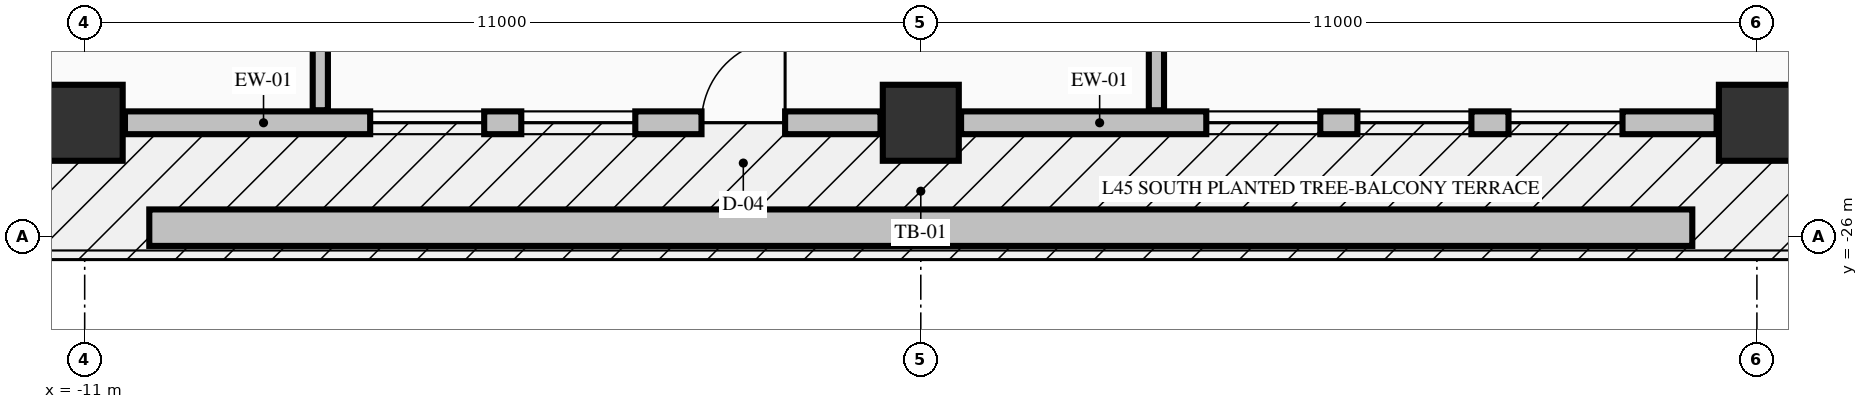
"""IFC4 building model, lengths in metres.
Left out: names, types, materials, properties, quantities, classifications, styles, units other than length and angle.
Written with IfcOpenShell. Run it as: python <this file> out.ifc"""

import sys

from ifc_helpers import new_model, si_unit, direction, frame, frame_2d, origin, origin_2d, place, context, subcontext, project, spatial, rectangle, extrude, element, fill, save


model = new_model("IFC4")
c1 = context("Model", 3, precision=1e-05, world=origin(), true_north=direction((0.0, 1.0)))
c2 = subcontext(c1, "Body", "Model", "MODEL_VIEW")
j1 = project(units=[si_unit("LENGTHUNIT", "METRE"), si_unit("PLANEANGLEUNIT", "RADIAN")], contexts=[c1])
p1 = place(None, origin())
s1 = spatial("IfcSite", under=j1, at=p1, CompositionType="ELEMENT")
p2 = place(p1, origin())
s2 = spatial("IfcBuilding", under=s1, at=p2, CompositionType="ELEMENT")
p3 = place(p2, frame((0.0, 0.0, 176.26)))
s3 = spatial("IfcBuildingStorey", under=s2, at=p3, CompositionType="ELEMENT", Elevation=176.26)
for number, where, z_axis, x_axis in (
    (1, (-11.0, -24.5, -0.275), (0.0, 0.0, 1.0), (1.0, 0.0, 0.0)),
    (2, (0.0, -24.5, -0.275), (0.0, 0.0, 1.0), (1.0, 0.0, 0.0)),
    (3, (11.0, -24.5, -0.275), (0.0, 0.0, 1.0), (1.0, 0.0, 0.0)),
):
    element("IfcColumn", number, at=place(p3, frame(where, z_axis=z_axis, x_axis=x_axis)), inside=s3, PredefinedType="COLUMN", context=c2, shape_type="SweptSolid", body=[
        extrude(rectangle(XDim=1.0, YDim=1.0, at=origin_2d()), origin(), (0.0, 0.0, 1.0), 3.425),
    ])
p4 = place(p3, frame((-10.47, -24.5, 0.0), z_axis=(0.0, 0.0, 1.0), x_axis=(1.0, 0.0, 0.0)))
e4 = element("IfcWall", 4, at=p4, inside=s3, PredefinedType="STANDARD", context=c2, shape_type="SweptSolid", body=[
    extrude(rectangle(XDim=9.94, YDim=0.3, at=frame_2d((4.97, 0.0))), origin(), (0.0, 0.0, 1.0), 2.542),
])
p5 = place(p4, frame((7.585, 0.0, 0.0)))
e5 = element("IfcOpeningElement", 5, at=p5, cuts=e4, PredefinedType="OPENING", context=c2, shape_type="SweptSolid", body=[
    extrude(rectangle(XDim=1.1, YDim=2.15, at=frame_2d((0.55, 1.075))), frame((0.0, 0.16, 0.0), z_axis=(0.0, -1.0, 0.0), x_axis=(1.0, 0.0, 0.0)), (0.0, 0.0, 1.0), 0.32),
])
p6 = place(p4, frame((3.226, 0.0, 0.72)))
e6 = element("IfcOpeningElement", 6, at=p6, cuts=e4, PredefinedType="OPENING", context=c2, shape_type="SweptSolid", body=[
    extrude(rectangle(XDim=1.5, YDim=1.6, at=frame_2d((0.75, 0.8))), frame((0.0, 0.16, 0.0), z_axis=(0.0, -1.0, 0.0), x_axis=(1.0, 0.0, 0.0)), (0.0, 0.0, 1.0), 0.32),
])
p7 = place(p4, frame((5.214, 0.0, 0.72)))
e7 = element("IfcOpeningElement", 7, at=p7, cuts=e4, PredefinedType="OPENING", context=c2, shape_type="SweptSolid", body=[
    extrude(rectangle(XDim=1.5, YDim=1.6, at=frame_2d((0.75, 0.8))), frame((0.0, 0.16, 0.0), z_axis=(0.0, -1.0, 0.0), x_axis=(1.0, 0.0, 0.0)), (0.0, 0.0, 1.0), 0.32),
])
p8 = place(p3, frame((0.53, -24.5, 0.0), z_axis=(0.0, 0.0, 1.0), x_axis=(1.0, 0.0, 0.0)))
e8 = element("IfcWall", 8, at=p8, inside=s3, PredefinedType="STANDARD", context=c2, shape_type="SweptSolid", body=[
    extrude(rectangle(XDim=9.94, YDim=0.3, at=frame_2d((4.97, 0.0))), origin(), (0.0, 0.0, 1.0), 2.542),
])
p9 = place(p8, frame((3.226, 0.0, 0.72)))
e9 = element("IfcOpeningElement", 9, at=p9, cuts=e8, PredefinedType="OPENING", context=c2, shape_type="SweptSolid", body=[
    extrude(rectangle(XDim=1.5, YDim=1.6, at=frame_2d((0.75, 0.8))), frame((0.0, 0.16, 0.0), z_axis=(0.0, -1.0, 0.0), x_axis=(1.0, 0.0, 0.0)), (0.0, 0.0, 1.0), 0.32),
])
p10 = place(p8, frame((5.214, 0.0, 0.72)))
e10 = element("IfcOpeningElement", 10, at=p10, cuts=e8, PredefinedType="OPENING", context=c2, shape_type="SweptSolid", body=[
    extrude(rectangle(XDim=1.5, YDim=1.6, at=frame_2d((0.75, 0.8))), frame((0.0, 0.16, 0.0), z_axis=(0.0, -1.0, 0.0), x_axis=(1.0, 0.0, 0.0)), (0.0, 0.0, 1.0), 0.32),
])
p11 = place(p8, frame((7.202, 0.0, 0.72)))
e11 = element("IfcOpeningElement", 11, at=p11, cuts=e8, PredefinedType="OPENING", context=c2, shape_type="SweptSolid", body=[
    extrude(rectangle(XDim=1.5, YDim=1.6, at=frame_2d((0.75, 0.8))), frame((0.0, 0.16, 0.0), z_axis=(0.0, -1.0, 0.0), x_axis=(1.0, 0.0, 0.0)), (0.0, 0.0, 1.0), 0.32),
])
p12 = place(p3, frame((-7.9, -24.335, 0.0), z_axis=(0.0, 0.0, 1.0), x_axis=(0.0, 1.0, 0.0)))
e12 = element("IfcWall", 12, at=p12, inside=s3, PredefinedType="PARTITIONING", context=c2, shape_type="SweptSolid", body=[
    extrude(rectangle(XDim=9.207, YDim=0.2, at=frame_2d((4.604, 0.0))), origin(), (0.0, 0.0, 1.0), 3.15),
])
p13 = place(p3, frame((3.1, -24.335, 0.0), z_axis=(0.0, 0.0, 1.0), x_axis=(0.0, 1.0, 0.0)))
e13 = element("IfcWall", 13, at=p13, inside=s3, PredefinedType="PARTITIONING", context=c2, shape_type="SweptSolid", body=[
    extrude(rectangle(XDim=8.507, YDim=0.2, at=frame_2d((4.253, 0.0))), origin(), (0.0, 0.0, 1.0), 3.15),
])
p14 = place(p3, frame((-10.15, -25.88, -0.04), z_axis=(0.0, 0.0, 1.0), x_axis=(1.0, 0.0, 0.0)))
e14 = element("IfcWall", 14, at=p14, inside=s3, PredefinedType="PARAPET", context=c2, shape_type="SweptSolid", body=[
    extrude(rectangle(XDim=20.3, YDim=0.48, at=frame_2d((10.15, 0.0))), origin(), (0.0, 0.0, 1.0), 0.52),
])
p15 = place(p5, origin())
e15 = element("IfcDoor", 15, at=p15, inside=s3, OperationType="SINGLE_SWING_RIGHT", PredefinedType="DOOR", context=c2, shape_type="SweptSolid", body=[
    extrude(rectangle(XDim=1.1, YDim=2.15, at=frame_2d((0.55, 1.075))), frame((0.0, 0.025, 0.0), z_axis=(0.0, -1.0, 0.0), x_axis=(1.0, 0.0, 0.0)), (0.0, 0.0, 1.0), 0.05),
])
fill(e5, e15)
p16 = place(p6, origin())
e16 = element("IfcWindow", 16, at=p16, inside=s3, PartitioningType="SINGLE_PANEL", PredefinedType="WINDOW", context=c2, shape_type="SweptSolid", body=[
    extrude(rectangle(XDim=1.5, YDim=1.6, at=frame_2d((0.75, 0.8))), frame((0.0, 0.03, 0.0), z_axis=(0.0, -1.0, 0.0), x_axis=(1.0, 0.0, 0.0)), (0.0, 0.0, 1.0), 0.06),
])
fill(e6, e16)
p17 = place(p7, origin())
e17 = element("IfcWindow", 17, at=p17, inside=s3, PartitioningType="SINGLE_PANEL", PredefinedType="WINDOW", context=c2, shape_type="SweptSolid", body=[
    extrude(rectangle(XDim=1.5, YDim=1.6, at=frame_2d((0.75, 0.8))), frame((0.0, 0.03, 0.0), z_axis=(0.0, -1.0, 0.0), x_axis=(1.0, 0.0, 0.0)), (0.0, 0.0, 1.0), 0.06),
])
fill(e7, e17)
p18 = place(p9, origin())
e18 = element("IfcWindow", 18, at=p18, inside=s3, PartitioningType="SINGLE_PANEL", PredefinedType="WINDOW", context=c2, shape_type="SweptSolid", body=[
    extrude(rectangle(XDim=1.5, YDim=1.6, at=frame_2d((0.75, 0.8))), frame((0.0, 0.03, 0.0), z_axis=(0.0, -1.0, 0.0), x_axis=(1.0, 0.0, 0.0)), (0.0, 0.0, 1.0), 0.06),
])
fill(e9, e18)
p19 = place(p10, origin())
e19 = element("IfcWindow", 19, at=p19, inside=s3, PartitioningType="SINGLE_PANEL", PredefinedType="WINDOW", context=c2, shape_type="SweptSolid", body=[
    extrude(rectangle(XDim=1.5, YDim=1.6, at=frame_2d((0.75, 0.8))), frame((0.0, 0.03, 0.0), z_axis=(0.0, -1.0, 0.0), x_axis=(1.0, 0.0, 0.0)), (0.0, 0.0, 1.0), 0.06),
])
fill(e10, e19)
p20 = place(p11, origin())
e20 = element("IfcWindow", 20, at=p20, inside=s3, PartitioningType="SINGLE_PANEL", PredefinedType="WINDOW", context=c2, shape_type="SweptSolid", body=[
    extrude(rectangle(XDim=1.5, YDim=1.6, at=frame_2d((0.75, 0.8))), frame((0.0, 0.03, 0.0), z_axis=(0.0, -1.0, 0.0), x_axis=(1.0, 0.0, 0.0)), (0.0, 0.0, 1.0), 0.06),
])
fill(e11, e20)
save(model, sys.argv[1])
